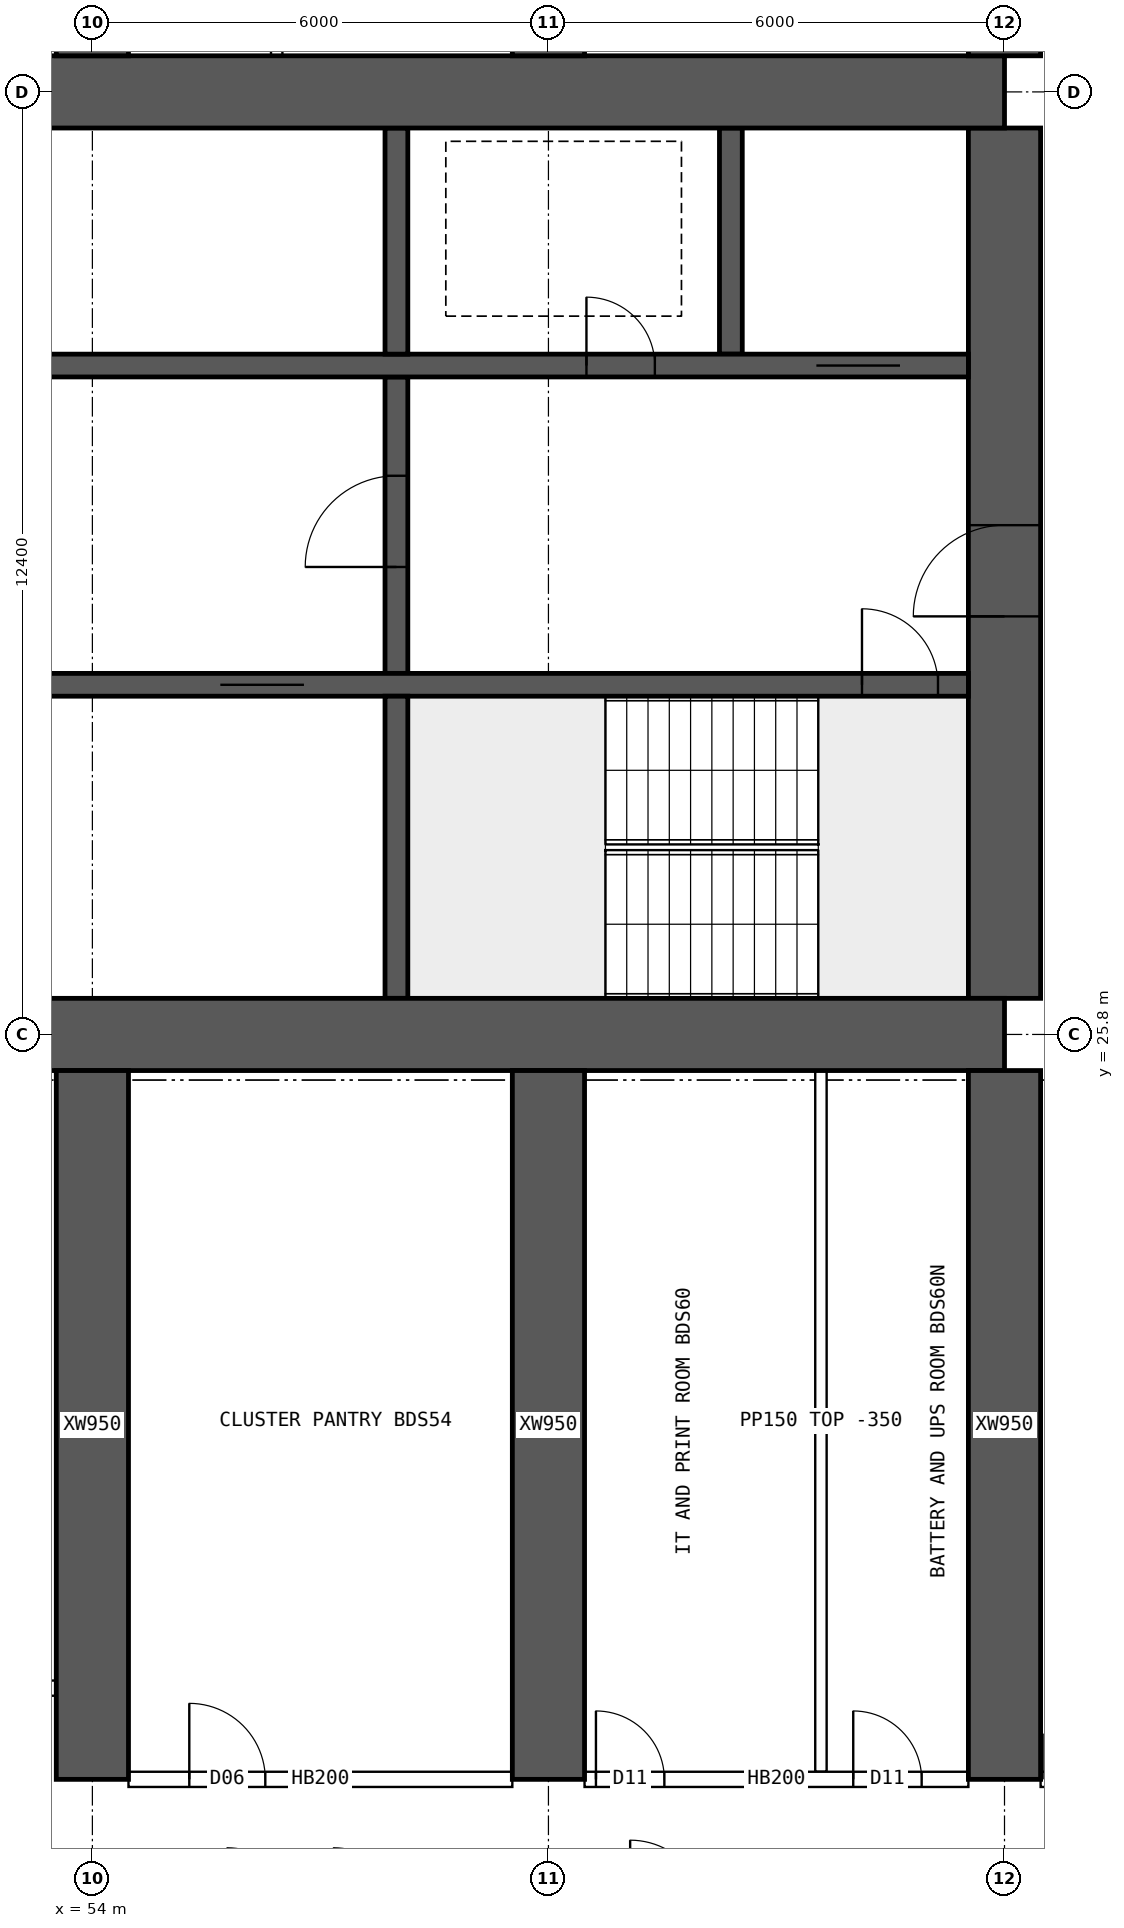
"""IFC4 building model, lengths in metres.
Left out: names, types, materials, properties, quantities, classifications, styles, units other than length and angle.
Written with IfcOpenShell. Run it as: python <this file> out.ifc"""

import sys

from ifc_helpers import new_model, si_unit, direction, frame, frame_2d, origin, place, context, subcontext, project, spatial, rectangle, extrude, element, fill, save


model = new_model("IFC4")
c1 = context("Model", 3, precision=1e-05, world=origin(), true_north=direction((0.0, 1.0)))
c2 = subcontext(c1, "Body", "Model", "MODEL_VIEW")
j1 = project(units=[si_unit("LENGTHUNIT", "METRE"), si_unit("PLANEANGLEUNIT", "RADIAN")], contexts=[c1])
p1 = place(None, origin())
s1 = spatial("IfcSite", under=j1, at=p1, CompositionType="ELEMENT")
p2 = place(p1, origin())
s2 = spatial("IfcBuilding", under=s1, at=p2, CompositionType="ELEMENT")
p3 = place(p2, frame((0.0, 0.0, 129.4)))
s3 = spatial("IfcBuildingStorey", under=s2, at=p3, CompositionType="ELEMENT", Elevation=129.4)
for number, where, z_axis, x_axis in (
    (1, (18.0, 25.8, 0.0), (0.0, 0.0, 1.0), (1.0, 0.0, 0.0)),
    (2, (18.0, 38.2, 0.0), (0.0, 0.0, 1.0), (1.0, 0.0, 0.0)),
):
    element("IfcWall", number, at=place(p3, frame(where, z_axis=z_axis, x_axis=x_axis)), inside=s3, PredefinedType="SHEAR", context=c2, shape_type="SweptSolid", body=[
        extrude(rectangle(XDim=48.0, YDim=0.95, at=frame_2d((24.0, 0.0))), origin(), (0.0, 0.0, 1.0), 3.75),
    ])
p4 = place(p3, frame((66.0, 26.275, 0.0), z_axis=(0.0, 0.0, 1.0), x_axis=(0.0, 1.0, 0.0)))
e3 = element("IfcWall", 3, at=p4, inside=s3, PredefinedType="SHEAR", context=c2, shape_type="SweptSolid", body=[
    extrude(rectangle(XDim=11.45, YDim=0.95, at=frame_2d((5.725, 0.0))), origin(), (0.0, 0.0, 1.0), 3.75),
])
p5 = place(p4, frame((5.025, 0.0, 0.0)))
e4 = element("IfcOpeningElement", 4, at=p5, cuts=e3, PredefinedType="OPENING", context=c2, shape_type="SweptSolid", body=[
    extrude(rectangle(XDim=1.2, YDim=2.1, at=frame_2d((0.6, 1.05))), frame((0.0, 0.485, 0.0), z_axis=(0.0, -1.0, 0.0), x_axis=(1.0, 0.0, 0.0)), (0.0, 0.0, 1.0), 0.97),
])
p6 = place(p3, frame((18.475, 30.4, 0.0), z_axis=(0.0, 0.0, 1.0), x_axis=(1.0, 0.0, 0.0)))
e5 = element("IfcWall", 5, at=p6, inside=s3, PredefinedType="SHEAR", context=c2, shape_type="SweptSolid", body=[
    extrude(rectangle(XDim=47.05, YDim=0.3, at=frame_2d((23.525, 0.0))), origin(), (0.0, 0.0, 1.0), 3.75),
])
p7 = place(p6, frame((0.4, 0.0, 0.0)))
e6 = element("IfcOpeningElement", 6, at=p7, cuts=e5, PredefinedType="OPENING", context=c2, shape_type="SweptSolid", body=[
    extrude(rectangle(XDim=1.0, YDim=2.1, at=frame_2d((0.5, 1.05))), frame((0.0, 0.16, 0.0), z_axis=(0.0, -1.0, 0.0), x_axis=(1.0, 0.0, 0.0)), (0.0, 0.0, 1.0), 0.32),
])
p8 = place(p6, frame((45.65, 0.0, 0.0)))
e7 = element("IfcOpeningElement", 7, at=p8, cuts=e5, PredefinedType="OPENING", context=c2, shape_type="SweptSolid", body=[
    extrude(rectangle(XDim=1.0, YDim=2.1, at=frame_2d((0.5, 1.05))), frame((0.0, 0.16, 0.0), z_axis=(0.0, -1.0, 0.0), x_axis=(1.0, 0.0, 0.0)), (0.0, 0.0, 1.0), 0.32),
])
p9 = place(p6, frame((8.275, 0.0, 0.0)))
e8 = element("IfcOpeningElement", 8, at=p9, cuts=e5, PredefinedType="OPENING", context=c2, shape_type="SweptSolid", body=[
    extrude(rectangle(XDim=1.1, YDim=2.1, at=frame_2d((0.55, 1.05))), frame((0.0, 0.16, 0.0), z_axis=(0.0, -1.0, 0.0), x_axis=(1.0, 0.0, 0.0)), (0.0, 0.0, 1.0), 0.32),
])
p10 = place(p6, frame((10.875, 0.0, 0.0)))
e9 = element("IfcOpeningElement", 9, at=p10, cuts=e5, PredefinedType="OPENING", context=c2, shape_type="SweptSolid", body=[
    extrude(rectangle(XDim=1.1, YDim=2.1, at=frame_2d((0.55, 1.05))), frame((0.0, 0.16, 0.0), z_axis=(0.0, -1.0, 0.0), x_axis=(1.0, 0.0, 0.0)), (0.0, 0.0, 1.0), 0.32),
])
p11 = place(p6, frame((13.475, 0.0, 0.0)))
e10 = element("IfcOpeningElement", 10, at=p11, cuts=e5, PredefinedType="OPENING", context=c2, shape_type="SweptSolid", body=[
    extrude(rectangle(XDim=1.1, YDim=2.1, at=frame_2d((0.55, 1.05))), frame((0.0, 0.16, 0.0), z_axis=(0.0, -1.0, 0.0), x_axis=(1.0, 0.0, 0.0)), (0.0, 0.0, 1.0), 0.32),
])
p12 = place(p6, frame((16.075, 0.0, 0.0)))
e11 = element("IfcOpeningElement", 11, at=p12, cuts=e5, PredefinedType="OPENING", context=c2, shape_type="SweptSolid", body=[
    extrude(rectangle(XDim=1.1, YDim=2.1, at=frame_2d((0.55, 1.05))), frame((0.0, 0.16, 0.0), z_axis=(0.0, -1.0, 0.0), x_axis=(1.0, 0.0, 0.0)), (0.0, 0.0, 1.0), 0.32),
])
p13 = place(p6, frame((18.85, 0.0, 0.0)))
e12 = element("IfcOpeningElement", 12, at=p13, cuts=e5, PredefinedType="OPENING", context=c2, shape_type="SweptSolid", body=[
    extrude(rectangle(XDim=0.9, YDim=2.1, at=frame_2d((0.45, 1.05))), frame((0.0, 0.16, 0.0), z_axis=(0.0, -1.0, 0.0), x_axis=(1.0, 0.0, 0.0)), (0.0, 0.0, 1.0), 0.32),
])
p14 = place(p6, frame((30.142, 0.0, 0.0)))
e13 = element("IfcOpeningElement", 13, at=p14, cuts=e5, PredefinedType="OPENING", context=c2, shape_type="SweptSolid", body=[
    extrude(rectangle(XDim=1.1, YDim=2.1, at=frame_2d((0.55, 1.05))), frame((0.0, 0.16, 0.0), z_axis=(0.0, -1.0, 0.0), x_axis=(1.0, 0.0, 0.0)), (0.0, 0.0, 1.0), 0.32),
])
p15 = place(p6, frame((33.675, 0.0, 0.0)))
e14 = element("IfcOpeningElement", 14, at=p15, cuts=e5, PredefinedType="OPENING", context=c2, shape_type="SweptSolid", body=[
    extrude(rectangle(XDim=1.1, YDim=2.1, at=frame_2d((0.55, 1.05))), frame((0.0, 0.16, 0.0), z_axis=(0.0, -1.0, 0.0), x_axis=(1.0, 0.0, 0.0)), (0.0, 0.0, 1.0), 0.32),
])
p16 = place(p6, frame((37.208, 0.0, 0.0)))
e15 = element("IfcOpeningElement", 15, at=p16, cuts=e5, PredefinedType="OPENING", context=c2, shape_type="SweptSolid", body=[
    extrude(rectangle(XDim=1.1, YDim=2.1, at=frame_2d((0.55, 1.05))), frame((0.0, 0.16, 0.0), z_axis=(0.0, -1.0, 0.0), x_axis=(1.0, 0.0, 0.0)), (0.0, 0.0, 1.0), 0.32),
])
p17 = place(p3, frame((18.475, 34.6, 0.0), z_axis=(0.0, 0.0, 1.0), x_axis=(1.0, 0.0, 0.0)))
e16 = element("IfcWall", 16, at=p17, inside=s3, PredefinedType="SHEAR", context=c2, shape_type="SweptSolid", body=[
    extrude(rectangle(XDim=47.05, YDim=0.3, at=frame_2d((23.525, 0.0))), origin(), (0.0, 0.0, 1.0), 3.75),
])
p18 = place(p17, frame((0.9, 0.0, 0.0)))
e17 = element("IfcOpeningElement", 17, at=p18, cuts=e16, PredefinedType="OPENING", context=c2, shape_type="SweptSolid", body=[
    extrude(rectangle(XDim=1.1, YDim=2.1, at=frame_2d((0.55, 1.05))), frame((0.0, 0.16, 0.0), z_axis=(0.0, -1.0, 0.0), x_axis=(1.0, 0.0, 0.0)), (0.0, 0.0, 1.0), 0.32),
])
p19 = place(p17, frame((45.05, 0.0, 0.0)))
e18 = element("IfcOpeningElement", 18, at=p19, cuts=e16, PredefinedType="OPENING", context=c2, shape_type="SweptSolid", body=[
    extrude(rectangle(XDim=1.1, YDim=2.1, at=frame_2d((0.55, 1.05))), frame((0.0, 0.16, 0.0), z_axis=(0.0, -1.0, 0.0), x_axis=(1.0, 0.0, 0.0)), (0.0, 0.0, 1.0), 0.32),
])
p20 = place(p17, frame((4.125, 0.0, 0.0)))
e19 = element("IfcOpeningElement", 19, at=p20, cuts=e16, PredefinedType="OPENING", context=c2, shape_type="SweptSolid", body=[
    extrude(rectangle(XDim=0.9, YDim=2.1, at=frame_2d((0.45, 1.05))), frame((0.0, 0.16, 0.0), z_axis=(0.0, -1.0, 0.0), x_axis=(1.0, 0.0, 0.0)), (0.0, 0.0, 1.0), 0.32),
])
p21 = place(p17, frame((42.025, 0.0, 0.0)))
e20 = element("IfcOpeningElement", 20, at=p21, cuts=e16, PredefinedType="OPENING", context=c2, shape_type="SweptSolid", body=[
    extrude(rectangle(XDim=0.9, YDim=2.1, at=frame_2d((0.45, 1.05))), frame((0.0, 0.16, 0.0), z_axis=(0.0, -1.0, 0.0), x_axis=(1.0, 0.0, 0.0)), (0.0, 0.0, 1.0), 0.32),
])
p22 = place(p17, frame((8.9, 0.0, 0.0)))
e21 = element("IfcOpeningElement", 21, at=p22, cuts=e16, PredefinedType="OPENING", context=c2, shape_type="SweptSolid", body=[
    extrude(rectangle(XDim=0.9, YDim=2.1, at=frame_2d((0.45, 1.05))), frame((0.0, 0.16, 0.0), z_axis=(0.0, -1.0, 0.0), x_axis=(1.0, 0.0, 0.0)), (0.0, 0.0, 1.0), 0.32),
])
p23 = place(p17, frame((12.874, 0.0, 0.0)))
e22 = element("IfcOpeningElement", 22, at=p23, cuts=e16, PredefinedType="OPENING", context=c2, shape_type="SweptSolid", body=[
    extrude(rectangle(XDim=0.9, YDim=2.1, at=frame_2d((0.45, 1.05))), frame((0.0, 0.16, 0.0), z_axis=(0.0, -1.0, 0.0), x_axis=(1.0, 0.0, 0.0)), (0.0, 0.0, 1.0), 0.32),
])
p24 = place(p17, frame((16.521, 0.0, 0.0)))
e23 = element("IfcOpeningElement", 23, at=p24, cuts=e16, PredefinedType="OPENING", context=c2, shape_type="SweptSolid", body=[
    extrude(rectangle(XDim=0.9, YDim=2.1, at=frame_2d((0.45, 1.05))), frame((0.0, 0.16, 0.0), z_axis=(0.0, -1.0, 0.0), x_axis=(1.0, 0.0, 0.0)), (0.0, 0.0, 1.0), 0.32),
])
p25 = place(p17, frame((20.28, 0.0, 0.0)))
e24 = element("IfcOpeningElement", 24, at=p25, cuts=e16, PredefinedType="OPENING", context=c2, shape_type="SweptSolid", body=[
    extrude(rectangle(XDim=0.9, YDim=2.1, at=frame_2d((0.45, 1.05))), frame((0.0, 0.16, 0.0), z_axis=(0.0, -1.0, 0.0), x_axis=(1.0, 0.0, 0.0)), (0.0, 0.0, 1.0), 0.32),
])
p26 = place(p17, frame((24.686, 0.0, 0.0)))
e25 = element("IfcOpeningElement", 25, at=p26, cuts=e16, PredefinedType="OPENING", context=c2, shape_type="SweptSolid", body=[
    extrude(rectangle(XDim=0.9, YDim=2.1, at=frame_2d((0.45, 1.05))), frame((0.0, 0.16, 0.0), z_axis=(0.0, -1.0, 0.0), x_axis=(1.0, 0.0, 0.0)), (0.0, 0.0, 1.0), 0.32),
])
p27 = place(p17, frame((27.483, 0.0, 0.0)))
e26 = element("IfcOpeningElement", 26, at=p27, cuts=e16, PredefinedType="OPENING", context=c2, shape_type="SweptSolid", body=[
    extrude(rectangle(XDim=0.9, YDim=2.1, at=frame_2d((0.45, 1.05))), frame((0.0, 0.16, 0.0), z_axis=(0.0, -1.0, 0.0), x_axis=(1.0, 0.0, 0.0)), (0.0, 0.0, 1.0), 0.32),
])
p28 = place(p17, frame((33.604, 0.0, 0.0)))
e27 = element("IfcOpeningElement", 27, at=p28, cuts=e16, PredefinedType="OPENING", context=c2, shape_type="SweptSolid", body=[
    extrude(rectangle(XDim=0.9, YDim=2.1, at=frame_2d((0.45, 1.05))), frame((0.0, 0.16, 0.0), z_axis=(0.0, -1.0, 0.0), x_axis=(1.0, 0.0, 0.0)), (0.0, 0.0, 1.0), 0.32),
])
p29 = place(p3, frame((58.0, 26.275, 0.0), z_axis=(0.0, 0.0, 1.0), x_axis=(0.0, 1.0, 0.0)))
e28 = element("IfcWall", 28, at=p29, inside=s3, PredefinedType="SHEAR", context=c2, shape_type="SweptSolid", body=[
    extrude(rectangle(XDim=3.975, YDim=0.3, at=frame_2d((1.988, 0.0))), origin(), (0.0, 0.0, 1.0), 3.75),
])
p30 = place(p3, frame((58.0, 30.55, 0.0), z_axis=(0.0, 0.0, 1.0), x_axis=(0.0, 1.0, 0.0)))
e29 = element("IfcWall", 29, at=p30, inside=s3, PredefinedType="SHEAR", context=c2, shape_type="SweptSolid", body=[
    extrude(rectangle(XDim=3.9, YDim=0.3, at=frame_2d((1.95, 0.0))), origin(), (0.0, 0.0, 1.0), 3.75),
])
p31 = place(p30, frame((1.4, 0.0, 0.0)))
e30 = element("IfcOpeningElement", 30, at=p31, cuts=e29, PredefinedType="OPENING", context=c2, shape_type="SweptSolid", body=[
    extrude(rectangle(XDim=1.2, YDim=2.1, at=frame_2d((0.6, 1.05))), frame((0.0, 0.16, 0.0), z_axis=(0.0, -1.0, 0.0), x_axis=(1.0, 0.0, 0.0)), (0.0, 0.0, 1.0), 0.32),
])
for number, where, z_axis, x_axis in (
    (31, (62.4, 34.75, 0.0), (0.0, 0.0, 1.0), (0.0, 1.0, 0.0)),
    (32, (58.0, 34.75, 0.0), (0.0, 0.0, 1.0), (0.0, 1.0, 0.0)),
):
    element("IfcWall", number, at=place(p3, frame(where, z_axis=z_axis, x_axis=x_axis)), inside=s3, PredefinedType="SHEAR", context=c2, shape_type="SweptSolid", body=[
        extrude(rectangle(XDim=2.975, YDim=0.3, at=frame_2d((1.488, 0.0))), origin(), (0.0, 0.0, 1.0), 3.75),
    ])
for number, where, z_axis, x_axis in (
    (33, (54.0, 16.0, 0.0), (0.0, 0.0, 1.0), (0.0, 1.0, 0.0)),
    (34, (54.0, 38.675, 0.0), (0.0, 0.0, 1.0), (0.0, 1.0, 0.0)),
    (35, (60.0, 16.0, 0.0), (0.0, 0.0, 1.0), (0.0, 1.0, 0.0)),
    (36, (60.0, 38.675, 0.0), (0.0, 0.0, 1.0), (0.0, 1.0, 0.0)),
    (37, (66.0, 16.0, 0.0), (0.0, 0.0, 1.0), (0.0, 1.0, 0.0)),
    (38, (66.0, 38.675, 0.0), (0.0, 0.0, 1.0), (0.0, 1.0, 0.0)),
):
    element("IfcWall", number, at=place(p3, frame(where, z_axis=z_axis, x_axis=x_axis)), inside=s3, PredefinedType="SHEAR", context=c2, shape_type="SweptSolid", body=[
        extrude(rectangle(XDim=9.325, YDim=0.95, at=frame_2d((4.663, 0.0))), origin(), (0.0, 0.0, 1.0), 3.75),
    ])
p32 = place(p3, frame((54.475, 16.0, 0.0), z_axis=(0.0, 0.0, 1.0), x_axis=(1.0, 0.0, 0.0)))
e39 = element("IfcWall", 39, at=p32, inside=s3, PredefinedType="SOLIDWALL", context=c2, shape_type="SweptSolid", body=[
    extrude(rectangle(XDim=5.05, YDim=0.2, at=frame_2d((2.525, 0.0))), origin(), (0.0, 0.0, 1.0), 3.4),
])
p33 = place(p32, frame((0.8, 0.0, 0.0)))
e40 = element("IfcOpeningElement", 40, at=p33, cuts=e39, PredefinedType="OPENING", context=c2, shape_type="SweptSolid", body=[
    extrude(rectangle(XDim=1.0, YDim=2.1, at=frame_2d((0.5, 1.05))), frame((0.0, 0.11, 0.0), z_axis=(0.0, -1.0, 0.0), x_axis=(1.0, 0.0, 0.0)), (0.0, 0.0, 1.0), 0.22),
])
p34 = place(p3, frame((60.475, 16.0, 0.0), z_axis=(0.0, 0.0, 1.0), x_axis=(1.0, 0.0, 0.0)))
e41 = element("IfcWall", 41, at=p34, inside=s3, PredefinedType="SOLIDWALL", context=c2, shape_type="SweptSolid", body=[
    extrude(rectangle(XDim=5.05, YDim=0.2, at=frame_2d((2.525, 0.0))), origin(), (0.0, 0.0, 1.0), 3.4),
])
p35 = place(p34, frame((0.15, 0.0, 0.0)))
e42 = element("IfcOpeningElement", 42, at=p35, cuts=e41, PredefinedType="OPENING", context=c2, shape_type="SweptSolid", body=[
    extrude(rectangle(XDim=0.9, YDim=2.1, at=frame_2d((0.45, 1.05))), frame((0.0, 0.11, 0.0), z_axis=(0.0, -1.0, 0.0), x_axis=(1.0, 0.0, 0.0)), (0.0, 0.0, 1.0), 0.22),
])
p36 = place(p34, frame((3.535, 0.0, 0.0)))
e43 = element("IfcOpeningElement", 43, at=p36, cuts=e41, PredefinedType="OPENING", context=c2, shape_type="SweptSolid", body=[
    extrude(rectangle(XDim=0.9, YDim=2.1, at=frame_2d((0.45, 1.05))), frame((0.0, 0.11, 0.0), z_axis=(0.0, -1.0, 0.0), x_axis=(1.0, 0.0, 0.0)), (0.0, 0.0, 1.0), 0.22),
])
p37 = place(p3, frame((66.475, 16.0, 0.0), z_axis=(0.0, 0.0, 1.0), x_axis=(1.0, 0.0, 0.0)))
e44 = element("IfcWall", 44, at=p37, inside=s3, PredefinedType="SOLIDWALL", context=c2, shape_type="SweptSolid", body=[
    extrude(rectangle(XDim=1.925, YDim=0.2, at=frame_2d((0.962, 0.0))), origin(), (0.0, 0.0, 1.0), 3.4),
])
p38 = place(p37, frame((0.05, 0.0, 0.0)))
e45 = element("IfcOpeningElement", 45, at=p38, cuts=e44, PredefinedType="OPENING", context=c2, shape_type="SweptSolid", body=[
    extrude(rectangle(XDim=1.2, YDim=2.1, at=frame_2d((0.6, 1.05))), frame((0.0, 0.11, 0.0), z_axis=(0.0, -1.0, 0.0), x_axis=(1.0, 0.0, 0.0)), (0.0, 0.0, 1.0), 0.22),
])
p39 = place(p3, frame((48.475, 17.2, 0.0), z_axis=(0.0, 0.0, 1.0), x_axis=(1.0, 0.0, 0.0)))
e46 = element("IfcWall", 46, at=p39, inside=s3, PredefinedType="SOLIDWALL", context=c2, shape_type="SweptSolid", body=[
    extrude(rectangle(XDim=5.05, YDim=0.2, at=frame_2d((2.525, 0.0))), origin(), (0.0, 0.0, 1.0), 3.4),
])
p40 = place(p39, frame((0.4, 0.0, 0.0)))
e47 = element("IfcOpeningElement", 47, at=p40, cuts=e46, PredefinedType="OPENING", context=c2, shape_type="SweptSolid", body=[
    extrude(rectangle(XDim=1.0, YDim=2.1, at=frame_2d((0.5, 1.05))), frame((0.0, 0.11, 0.0), z_axis=(0.0, -1.0, 0.0), x_axis=(1.0, 0.0, 0.0)), (0.0, 0.0, 1.0), 0.22),
])
for number, where, z_axis, x_axis in (
    (48, (63.585, 16.1, 0.0), (0.0, 0.0, 1.0), (0.0, 1.0, 0.0)),
    (49, (56.425, 38.675, 0.0), (0.0, 0.0, 1.0), (0.0, 1.0, 0.0)),
):
    element("IfcWall", number, at=place(p3, frame(where, z_axis=z_axis, x_axis=x_axis)), inside=s3, PredefinedType="PARTITIONING", context=c2, shape_type="SweptSolid", body=[
        extrude(rectangle(XDim=9.225, YDim=0.15, at=frame_2d((4.612, 0.0))), origin(), (0.0, 0.0, 1.0), 3.4),
    ])
p41 = place(p5, origin())
e50 = element("IfcDoor", 50, at=p41, inside=s3, OperationType="SINGLE_SWING_LEFT", PredefinedType="DOOR", context=c2, shape_type="SweptSolid", body=[
    extrude(rectangle(XDim=1.2, YDim=2.1, at=frame_2d((0.6, 1.05))), frame((0.0, 0.025, 0.0), z_axis=(0.0, -1.0, 0.0), x_axis=(1.0, 0.0, 0.0)), (0.0, 0.0, 1.0), 0.05),
])
fill(e4, e50)
p42 = place(p8, origin())
e51 = element("IfcDoor", 51, at=p42, inside=s3, OperationType="SINGLE_SWING_LEFT", PredefinedType="DOOR", context=c2, shape_type="SweptSolid", body=[
    extrude(rectangle(XDim=1.0, YDim=2.1, at=frame_2d((0.5, 1.05))), frame((0.0, 0.025, 0.0), z_axis=(0.0, -1.0, 0.0), x_axis=(1.0, 0.0, 0.0)), (0.0, 0.0, 1.0), 0.05),
])
fill(e7, e51)
p43 = place(p19, origin())
e52 = element("IfcDoor", 52, at=p43, inside=s3, OperationType="DOUBLE_DOOR_SLIDING", PredefinedType="DOOR", context=c2, shape_type="SweptSolid", body=[
    extrude(rectangle(XDim=1.1, YDim=2.1, at=frame_2d((0.55, 1.05))), frame((0.0, 0.025, 0.0), z_axis=(0.0, -1.0, 0.0), x_axis=(1.0, 0.0, 0.0)), (0.0, 0.0, 1.0), 0.05),
])
fill(e18, e52)
p44 = place(p21, origin())
e53 = element("IfcDoor", 53, at=p44, inside=s3, OperationType="SINGLE_SWING_LEFT", PredefinedType="DOOR", context=c2, shape_type="SweptSolid", body=[
    extrude(rectangle(XDim=0.9, YDim=2.1, at=frame_2d((0.45, 1.05))), frame((0.0, 0.025, 0.0), z_axis=(0.0, -1.0, 0.0), x_axis=(1.0, 0.0, 0.0)), (0.0, 0.0, 1.0), 0.05),
])
fill(e20, e53)
p45 = place(p31, origin())
e54 = element("IfcDoor", 54, at=p45, inside=s3, OperationType="SINGLE_SWING_LEFT", PredefinedType="DOOR", context=c2, shape_type="SweptSolid", body=[
    extrude(rectangle(XDim=1.2, YDim=2.1, at=frame_2d((0.6, 1.05))), frame((0.0, 0.025, 0.0), z_axis=(0.0, -1.0, 0.0), x_axis=(1.0, 0.0, 0.0)), (0.0, 0.0, 1.0), 0.05),
])
fill(e30, e54)
p46 = place(p16, origin())
e55 = element("IfcDoor", 55, at=p46, inside=s3, OperationType="DOUBLE_DOOR_SLIDING", PredefinedType="DOOR", context=c2, shape_type="SweptSolid", body=[
    extrude(rectangle(XDim=1.1, YDim=2.1, at=frame_2d((0.55, 1.05))), frame((0.0, 0.025, 0.0), z_axis=(0.0, -1.0, 0.0), x_axis=(1.0, 0.0, 0.0)), (0.0, 0.0, 1.0), 0.05),
])
fill(e15, e55)
p47 = place(p33, origin())
e56 = element("IfcDoor", 56, at=p47, inside=s3, OperationType="SINGLE_SWING_LEFT", PredefinedType="DOOR", context=c2, shape_type="SweptSolid", body=[
    extrude(rectangle(XDim=1.0, YDim=2.1, at=frame_2d((0.5, 1.05))), frame((0.0, 0.025, 0.0), z_axis=(0.0, -1.0, 0.0), x_axis=(1.0, 0.0, 0.0)), (0.0, 0.0, 1.0), 0.05),
])
fill(e40, e56)
p48 = place(p35, origin())
e57 = element("IfcDoor", 57, at=p48, inside=s3, OperationType="SINGLE_SWING_LEFT", PredefinedType="DOOR", context=c2, shape_type="SweptSolid", body=[
    extrude(rectangle(XDim=0.9, YDim=2.1, at=frame_2d((0.45, 1.05))), frame((0.0, 0.025, 0.0), z_axis=(0.0, -1.0, 0.0), x_axis=(1.0, 0.0, 0.0)), (0.0, 0.0, 1.0), 0.05),
])
fill(e42, e57)
p49 = place(p36, origin())
e58 = element("IfcDoor", 58, at=p49, inside=s3, OperationType="SINGLE_SWING_LEFT", PredefinedType="DOOR", context=c2, shape_type="SweptSolid", body=[
    extrude(rectangle(XDim=0.9, YDim=2.1, at=frame_2d((0.45, 1.05))), frame((0.0, 0.025, 0.0), z_axis=(0.0, -1.0, 0.0), x_axis=(1.0, 0.0, 0.0)), (0.0, 0.0, 1.0), 0.05),
])
fill(e43, e58)
save(model, sys.argv[1])
